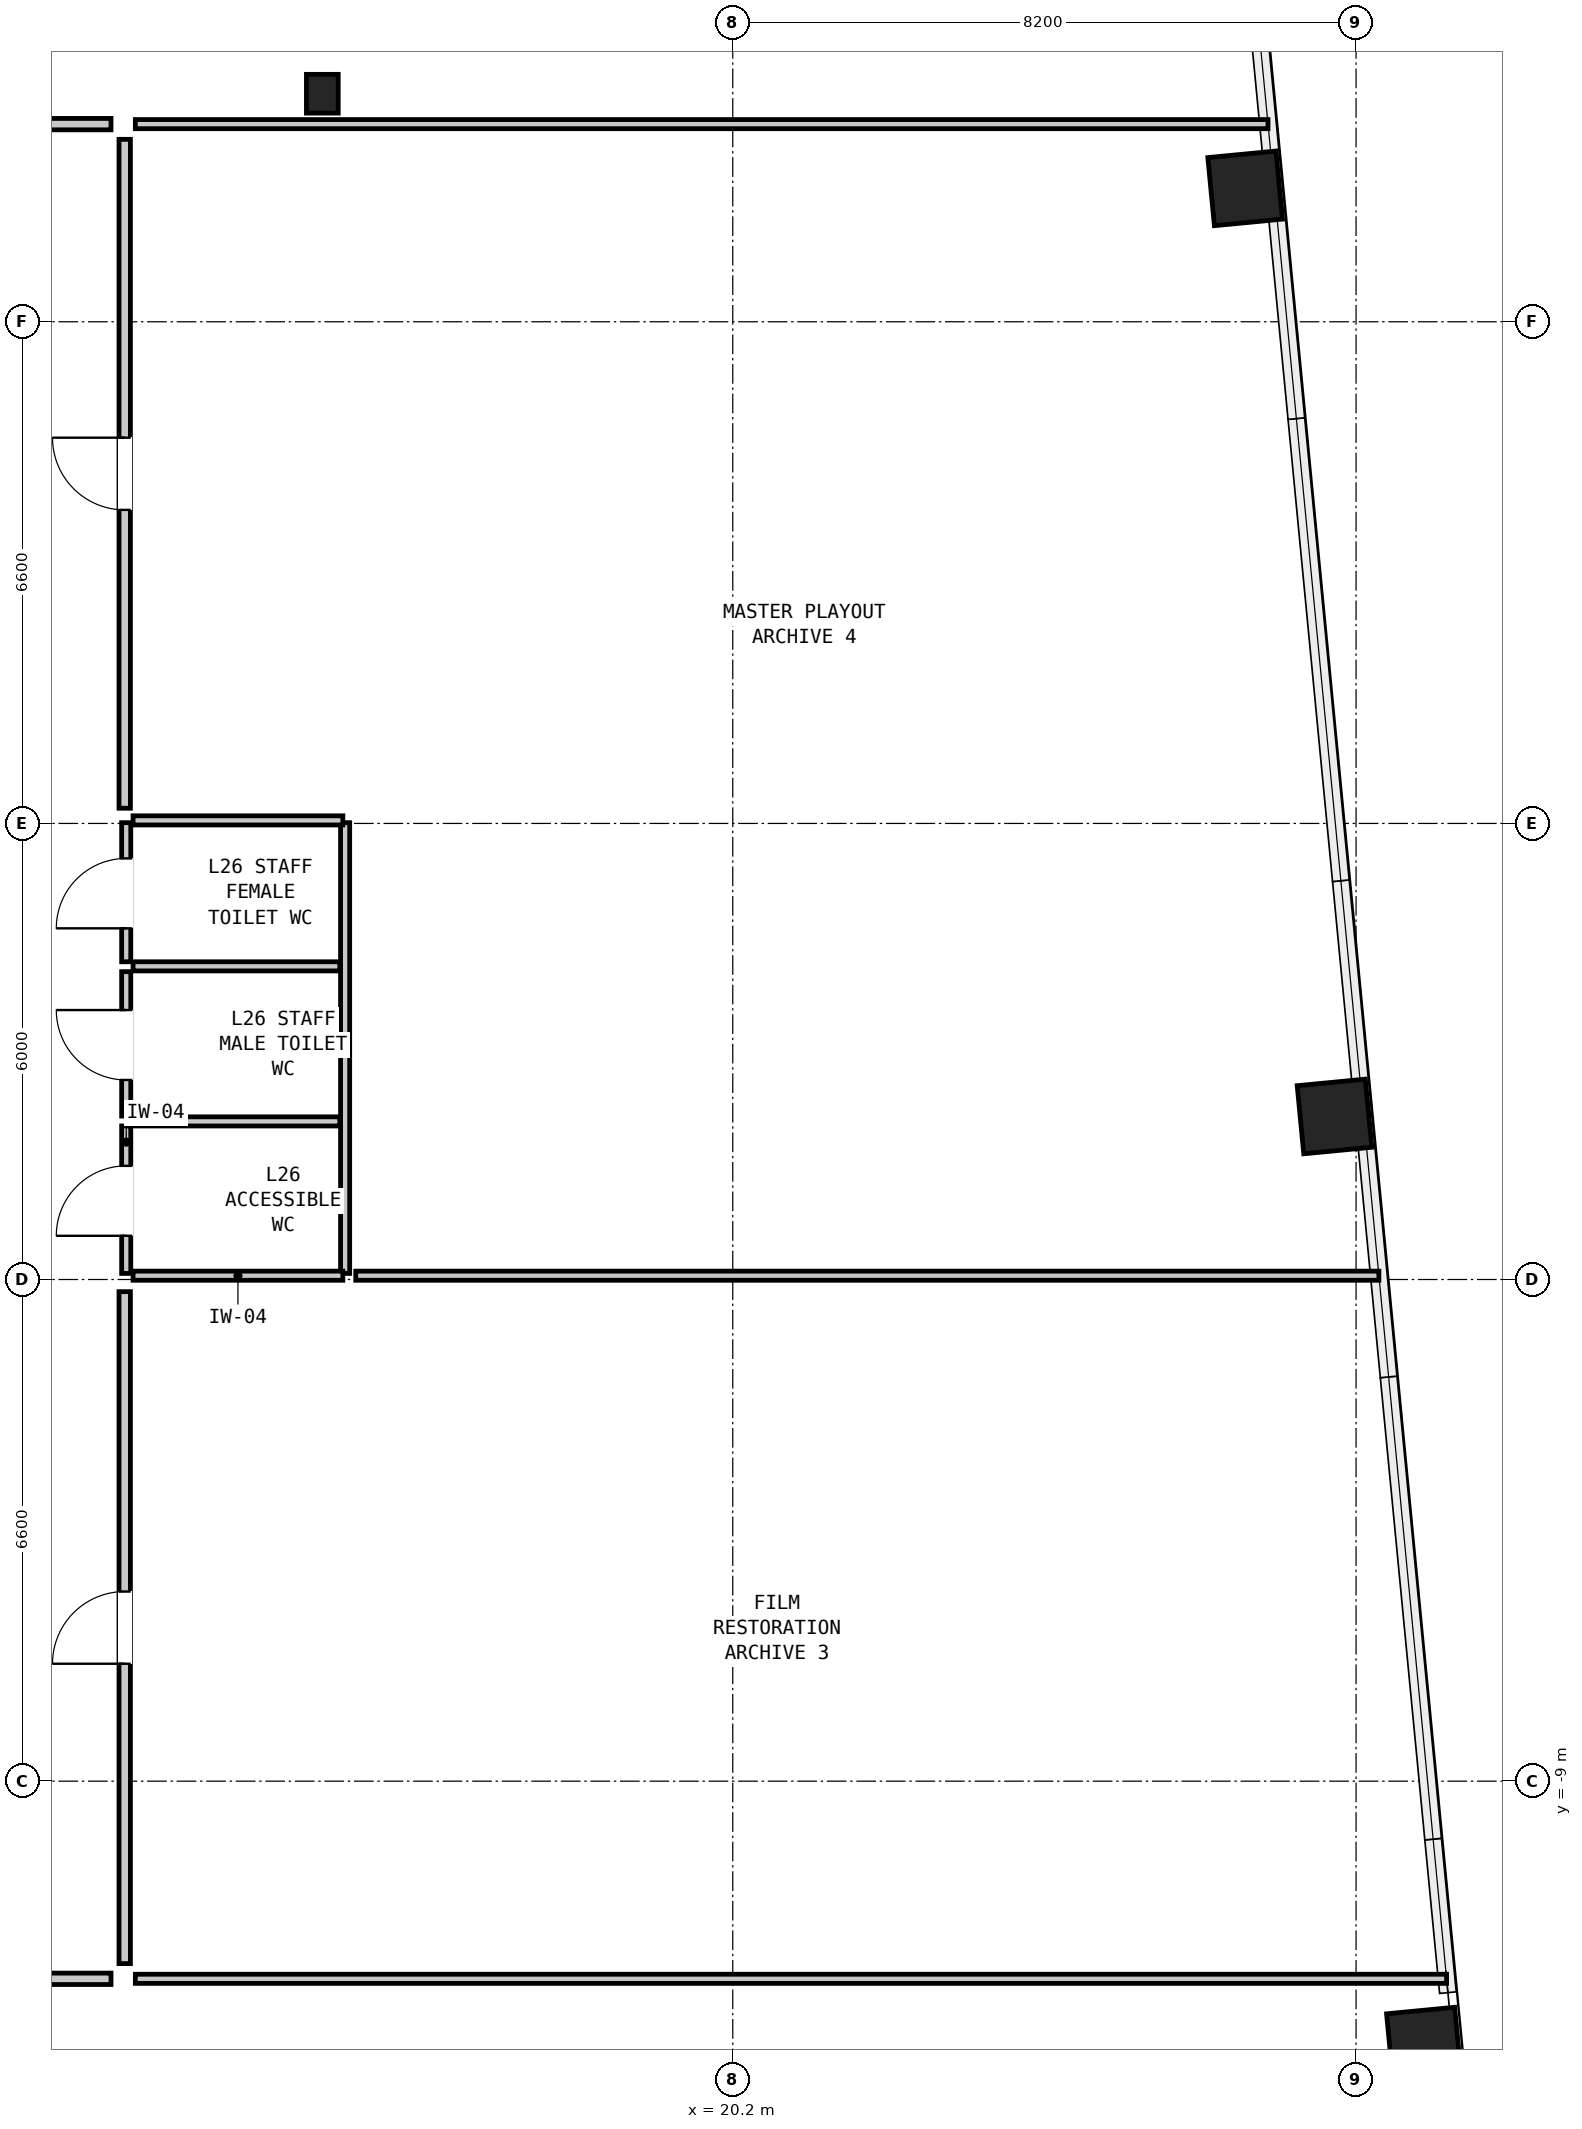
"""IFC4 building model, lengths in metres.
Left out: names, types, materials, properties, quantities, classifications, styles, units other than length and angle.
Written with IfcOpenShell. Run it as: python <this file> out.ifc"""

import sys

from ifc_helpers import new_model, si_unit, direction, frame, frame_2d, origin, origin_2d, place, context, subcontext, project, spatial, rectangle, hollow_rectangle, i_section, extrude, element, fill, save


model = new_model("IFC4")
c1 = context("Model", 3, precision=1e-05, world=origin(), true_north=direction((0.0, 1.0)))
c2 = subcontext(c1, "Body", "Model", "MODEL_VIEW")
j1 = project(units=[si_unit("LENGTHUNIT", "METRE"), si_unit("PLANEANGLEUNIT", "RADIAN")], contexts=[c1])
p1 = place(None, origin())
s1 = spatial("IfcSite", under=j1, at=p1, CompositionType="ELEMENT")
p2 = place(p1, origin())
s2 = spatial("IfcBuilding", under=s1, at=p2, CompositionType="ELEMENT")
p3 = place(p2, frame((0.0, 0.0, 90.8)))
s3 = spatial("IfcBuildingStorey", under=s2, at=p3, CompositionType="ELEMENT", Elevation=90.8)
for number, where, z_axis, x_axis in (
    (1, (29.292, -12.465, 0.0), (0.0, 0.0, 1.0), (-0.096, 0.995, 0.0)),
    (2, (28.117, -0.255, 0.0), (0.0, 0.0, 1.0), (-0.096, 0.995, 0.0)),
    (3, (26.941, 11.955, 0.0), (0.0, 0.0, 1.0), (-0.096, 0.995, 0.0)),
):
    element("IfcColumn", number, at=place(p3, frame(where, z_axis=z_axis, x_axis=x_axis)), inside=s3, PredefinedType="COLUMN", context=c2, shape_type="SweptSolid", body=[
        extrude(hollow_rectangle(XDim=0.9, YDim=0.9, WallThickness=0.055, at=origin_2d()), origin(), (0.0, 0.0, 1.0), 3.05),
    ])
p4 = place(p3, frame((14.8, 13.2, 0.0), z_axis=(0.0, 0.0, 1.0), x_axis=(1.0, 0.0, 0.0)))
e4 = element("IfcColumn", 4, at=p4, inside=s3, PredefinedType="COLUMN", context=c2, shape_type="SweptSolid", body=[
    extrude(i_section(OverallWidth=0.418, OverallDepth=0.51, WebThickness=0.042, FlangeThickness=0.068, at=origin_2d()), origin(), (0.0, 0.0, 1.0), 3.05),
])
p5 = place(p3, frame((12.22, -2.32, 0.0), z_axis=(0.0, 0.0, 1.0), x_axis=(0.0, 1.0, 0.0)))
e5 = element("IfcWall", 5, at=p5, inside=s3, PredefinedType="PARTITIONING", context=c2, shape_type="SweptSolid", body=[
    extrude(rectangle(XDim=1.94, YDim=0.12, at=frame_2d((0.97, 0.0))), origin(), (0.0, 0.0, 1.0), 2.83),
])
p6 = place(p5, frame((0.495, 0.0, 0.0)))
e6 = element("IfcOpeningElement", 6, at=p6, cuts=e5, PredefinedType="OPENING", context=c2, shape_type="SweptSolid", body=[
    extrude(rectangle(XDim=0.92, YDim=2.1, at=frame_2d((0.46, 1.05))), frame((0.0, 0.072, 0.0), z_axis=(0.0, -1.0, 0.0), x_axis=(1.0, 0.0, 0.0)), (0.0, 0.0, 1.0), 0.144),
])
p7 = place(p3, frame((12.22, -0.25, 0.0), z_axis=(0.0, 0.0, 1.0), x_axis=(0.0, 1.0, 0.0)))
e7 = element("IfcWall", 7, at=p7, inside=s3, PredefinedType="PARTITIONING", context=c2, shape_type="SweptSolid", body=[
    extrude(rectangle(XDim=1.9, YDim=0.12, at=frame_2d((0.95, 0.0))), origin(), (0.0, 0.0, 1.0), 2.83),
])
p8 = place(p7, frame((0.475, 0.0, 0.0)))
e8 = element("IfcOpeningElement", 8, at=p8, cuts=e7, PredefinedType="OPENING", context=c2, shape_type="SweptSolid", body=[
    extrude(rectangle(XDim=0.92, YDim=2.1, at=frame_2d((0.46, 1.05))), frame((0.0, 0.072, 0.0), z_axis=(0.0, -1.0, 0.0), x_axis=(1.0, 0.0, 0.0)), (0.0, 0.0, 1.0), 0.144),
])
p9 = place(p3, frame((12.22, 1.78, 0.0), z_axis=(0.0, 0.0, 1.0), x_axis=(0.0, 1.0, 0.0)))
e9 = element("IfcWall", 9, at=p9, inside=s3, PredefinedType="PARTITIONING", context=c2, shape_type="SweptSolid", body=[
    extrude(rectangle(XDim=1.83, YDim=0.12, at=frame_2d((0.915, 0.0))), origin(), (0.0, 0.0, 1.0), 2.83),
])
p10 = place(p9, frame((0.44, 0.0, 0.0)))
e10 = element("IfcOpeningElement", 10, at=p10, cuts=e9, PredefinedType="OPENING", context=c2, shape_type="SweptSolid", body=[
    extrude(rectangle(XDim=0.92, YDim=2.1, at=frame_2d((0.46, 1.05))), frame((0.0, 0.072, 0.0), z_axis=(0.0, -1.0, 0.0), x_axis=(1.0, 0.0, 0.0)), (0.0, 0.0, 1.0), 0.144),
])
p11 = place(p3, frame((15.1, -2.32, 0.0), z_axis=(0.0, 0.0, 1.0), x_axis=(0.0, 1.0, 0.0)))
e11 = element("IfcWall", 11, at=p11, inside=s3, PredefinedType="PARTITIONING", context=c2, shape_type="SweptSolid", body=[
    extrude(rectangle(XDim=5.93, YDim=0.12, at=frame_2d((2.965, 0.0))), origin(), (0.0, 0.0, 1.0), 2.83),
])
for number, where, z_axis, x_axis in (
    (12, (12.31, -2.35, 0.0), (0.0, 0.0, 1.0), (1.0, 0.0, 0.0)),
    (13, (12.31, 3.64, 0.0), (0.0, 0.0, 1.0), (1.0, 0.0, 0.0)),
):
    element("IfcWall", number, at=place(p3, frame(where, z_axis=z_axis, x_axis=x_axis)), inside=s3, PredefinedType="PARTITIONING", context=c2, shape_type="SweptSolid", body=[
        extrude(rectangle(XDim=2.76, YDim=0.12, at=frame_2d((1.38, 0.0))), origin(), (0.0, 0.0, 1.0), 1.799),
    ])
for number, where, z_axis, x_axis in (
    (14, (12.31, -0.32, 0.0), (0.0, 0.0, 1.0), (1.0, 0.0, 0.0)),
    (15, (12.31, 1.72, 0.0), (0.0, 0.0, 1.0), (1.0, 0.0, 0.0)),
):
    element("IfcWall", number, at=place(p3, frame(where, z_axis=z_axis, x_axis=x_axis)), inside=s3, PredefinedType="PARTITIONING", context=c2, shape_type="SweptSolid", body=[
        extrude(rectangle(XDim=2.72, YDim=0.12, at=frame_2d((1.36, 0.0))), origin(), (0.0, 0.0, 1.0), 2.83),
    ])
p12 = place(p3, frame((12.34, 12.8, 0.0), z_axis=(0.0, 0.0, 1.0), x_axis=(1.0, 0.0, 0.0)))
e16 = element("IfcWall", 16, at=p12, inside=s3, PredefinedType="PARTITIONING", context=c2, shape_type="SweptSolid", body=[
    extrude(rectangle(XDim=14.902, YDim=0.12, at=frame_2d((7.451, 0.0))), origin(), (0.0, 0.0, 1.0), 2.83),
])
p13 = place(p3, frame((12.34, -11.6, 0.0), z_axis=(0.0, 0.0, 1.0), x_axis=(1.0, 0.0, 0.0)))
e17 = element("IfcWall", 17, at=p13, inside=s3, PredefinedType="PARTITIONING", context=c2, shape_type="SweptSolid", body=[
    extrude(rectangle(XDim=17.251, YDim=0.12, at=frame_2d((8.625, 0.0))), origin(), (0.0, 0.0, 1.0), 2.274),
])
p14 = place(p3, frame((15.24, -2.35, 0.0), z_axis=(0.0, 0.0, 1.0), x_axis=(1.0, 0.0, 0.0)))
e18 = element("IfcWall", 18, at=p14, inside=s3, PredefinedType="PARTITIONING", context=c2, shape_type="SweptSolid", body=[
    extrude(rectangle(XDim=13.46, YDim=0.12, at=frame_2d((6.73, 0.0))), origin(), (0.0, 0.0, 1.0), 1.799),
])
p15 = place(p3, frame((6.68, 12.8, 0.0), z_axis=(0.0, 0.0, 1.0), x_axis=(1.0, 0.0, 0.0)))
e19 = element("IfcWall", 19, at=p15, inside=s3, PredefinedType="PARTITIONING", context=c2, shape_type="SweptSolid", body=[
    extrude(rectangle(XDim=5.34, YDim=0.15, at=frame_2d((2.67, 0.0))), origin(), (0.0, 0.0, 1.0), 2.83),
])
p16 = place(p15, frame((1.395, 0.0, 0.0)))
e20 = element("IfcOpeningElement", 20, at=p16, cuts=e19, PredefinedType="OPENING", context=c2, shape_type="SweptSolid", body=[
    extrude(rectangle(XDim=0.95, YDim=2.1, at=frame_2d((0.475, 1.05))), frame((0.0, 0.087, 0.0), z_axis=(0.0, -1.0, 0.0), x_axis=(1.0, 0.0, 0.0)), (0.0, 0.0, 1.0), 0.174),
])
p17 = place(p3, frame((7.68, -11.6, 0.0), z_axis=(0.0, 0.0, 1.0), x_axis=(1.0, 0.0, 0.0)))
e21 = element("IfcWall", 21, at=p17, inside=s3, PredefinedType="PARTITIONING", context=c2, shape_type="SweptSolid", body=[
    extrude(rectangle(XDim=4.34, YDim=0.15, at=frame_2d((2.17, 0.0))), origin(), (0.0, 0.0, 1.0), 2.274),
])
p18 = place(p17, frame((2.095, 0.0, 0.0)))
e22 = element("IfcOpeningElement", 22, at=p18, cuts=e21, PredefinedType="OPENING", context=c2, shape_type="SweptSolid", body=[
    extrude(rectangle(XDim=0.95, YDim=2.1, at=frame_2d((0.475, 1.05))), frame((0.0, 0.087, 0.0), z_axis=(0.0, -1.0, 0.0), x_axis=(1.0, 0.0, 0.0)), (0.0, 0.0, 1.0), 0.174),
])
p19 = place(p3, frame((12.2, -11.4, 0.0), z_axis=(0.0, 0.0, 1.0), x_axis=(0.0, 1.0, 0.0)))
e23 = element("IfcWall", 23, at=p19, inside=s3, PredefinedType="PARTITIONING", context=c2, shape_type="SweptSolid", body=[
    extrude(rectangle(XDim=8.84, YDim=0.15, at=frame_2d((4.42, 0.0))), origin(), (0.0, 0.0, 1.0), 2.83),
])
p20 = place(p19, frame((3.945, 0.0, 0.0)))
e24 = element("IfcOpeningElement", 24, at=p20, cuts=e23, PredefinedType="OPENING", context=c2, shape_type="SweptSolid", body=[
    extrude(rectangle(XDim=0.95, YDim=2.1, at=frame_2d((0.475, 1.05))), frame((0.0, 0.087, 0.0), z_axis=(0.0, -1.0, 0.0), x_axis=(1.0, 0.0, 0.0)), (0.0, 0.0, 1.0), 0.174),
])
p21 = place(p3, frame((12.2, 3.8, 0.0), z_axis=(0.0, 0.0, 1.0), x_axis=(0.0, 1.0, 0.0)))
e25 = element("IfcWall", 25, at=p21, inside=s3, PredefinedType="PARTITIONING", context=c2, shape_type="SweptSolid", body=[
    extrude(rectangle(XDim=8.8, YDim=0.15, at=frame_2d((4.4, 0.0))), origin(), (0.0, 0.0, 1.0), 2.83),
])
p22 = place(p21, frame((3.925, 0.0, 0.0)))
e26 = element("IfcOpeningElement", 26, at=p22, cuts=e25, PredefinedType="OPENING", context=c2, shape_type="SweptSolid", body=[
    extrude(rectangle(XDim=0.95, YDim=2.1, at=frame_2d((0.475, 1.05))), frame((0.0, 0.087, 0.0), z_axis=(0.0, -1.0, 0.0), x_axis=(1.0, 0.0, 0.0)), (0.0, 0.0, 1.0), 0.174),
])
p23 = place(p6, origin())
e27 = element("IfcDoor", 27, at=p23, inside=s3, OperationType="SINGLE_SWING_LEFT", PredefinedType="DOOR", context=c2, shape_type="SweptSolid", body=[
    extrude(rectangle(XDim=0.92, YDim=2.1, at=frame_2d((0.46, 1.05))), frame((0.0, 0.025, 0.0), z_axis=(0.0, -1.0, 0.0), x_axis=(1.0, 0.0, 0.0)), (0.0, 0.0, 1.0), 0.05),
])
fill(e6, e27)
p24 = place(p8, origin())
e28 = element("IfcDoor", 28, at=p24, inside=s3, OperationType="SINGLE_SWING_RIGHT", PredefinedType="DOOR", context=c2, shape_type="SweptSolid", body=[
    extrude(rectangle(XDim=0.92, YDim=2.1, at=frame_2d((0.46, 1.05))), frame((0.0, 0.025, 0.0), z_axis=(0.0, -1.0, 0.0), x_axis=(1.0, 0.0, 0.0)), (0.0, 0.0, 1.0), 0.05),
])
fill(e8, e28)
p25 = place(p10, origin())
e29 = element("IfcDoor", 29, at=p25, inside=s3, OperationType="SINGLE_SWING_LEFT", PredefinedType="DOOR", context=c2, shape_type="SweptSolid", body=[
    extrude(rectangle(XDim=0.92, YDim=2.1, at=frame_2d((0.46, 1.05))), frame((0.0, 0.025, 0.0), z_axis=(0.0, -1.0, 0.0), x_axis=(1.0, 0.0, 0.0)), (0.0, 0.0, 1.0), 0.05),
])
fill(e10, e29)
p26 = place(p20, origin())
e30 = element("IfcDoor", 30, at=p26, inside=s3, OperationType="SINGLE_SWING_LEFT", PredefinedType="DOOR", context=c2, shape_type="SweptSolid", body=[
    extrude(rectangle(XDim=0.95, YDim=2.1, at=frame_2d((0.475, 1.05))), frame((0.0, 0.025, 0.0), z_axis=(0.0, -1.0, 0.0), x_axis=(1.0, 0.0, 0.0)), (0.0, 0.0, 1.0), 0.05),
])
fill(e24, e30)
p27 = place(p22, origin())
e31 = element("IfcDoor", 31, at=p27, inside=s3, OperationType="SINGLE_SWING_RIGHT", PredefinedType="DOOR", context=c2, shape_type="SweptSolid", body=[
    extrude(rectangle(XDim=0.95, YDim=2.1, at=frame_2d((0.475, 1.05))), frame((0.0, 0.025, 0.0), z_axis=(0.0, -1.0, 0.0), x_axis=(1.0, 0.0, 0.0)), (0.0, 0.0, 1.0), 0.05),
])
fill(e26, e31)
save(model, sys.argv[1])
